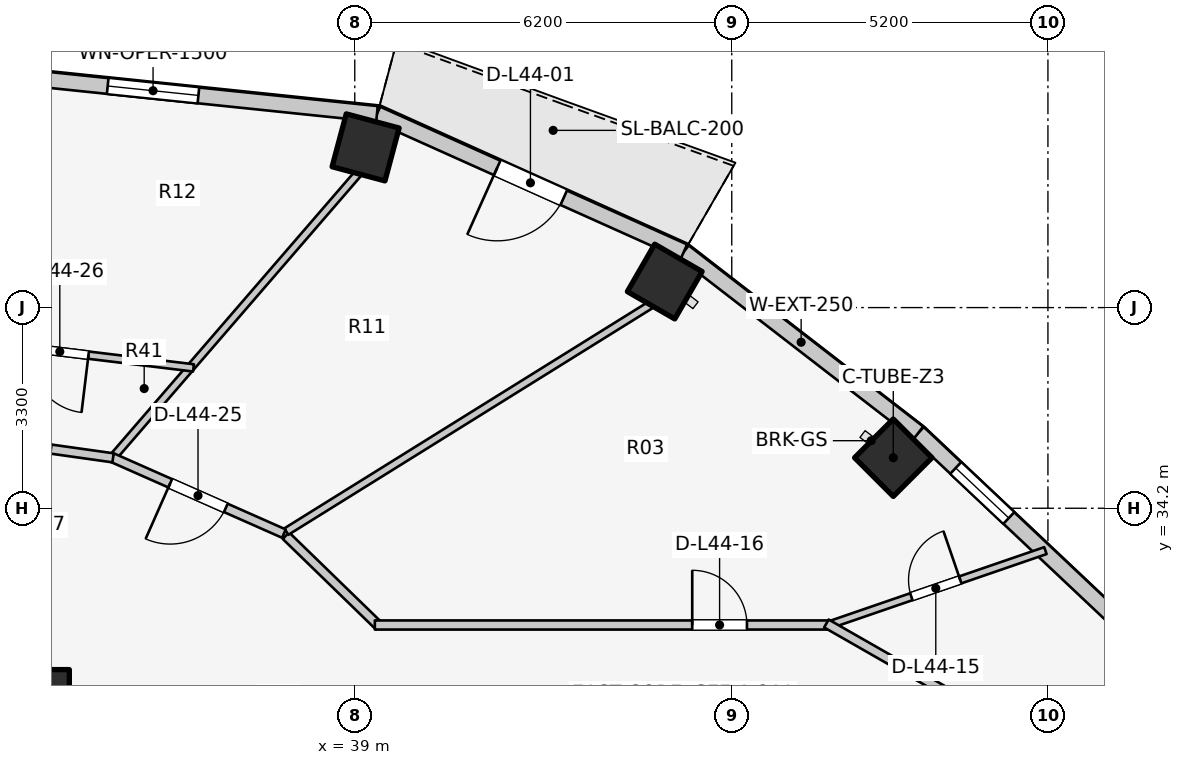
"""IFC4 building model, lengths in metres.
Left out: names, types, materials, properties, quantities, classifications, styles, units other than length and angle.
Written with IfcOpenShell. Run it as: python <this file> out.ifc"""

import sys

from ifc_helpers import new_model, si_unit, direction, frame, frame_2d, origin, origin_2d, place, context, subcontext, project, spatial, rectangle, extrude, element, fill, save


model = new_model("IFC4")
c1 = context("Model", 3, precision=1e-05, world=origin(), true_north=direction((0.0, 1.0)))
c2 = subcontext(c1, "Body", "Model", "MODEL_VIEW")
j1 = project(units=[si_unit("LENGTHUNIT", "METRE"), si_unit("PLANEANGLEUNIT", "RADIAN")], contexts=[c1])
p1 = place(None, origin())
s1 = spatial("IfcSite", under=j1, at=p1, CompositionType="ELEMENT")
p2 = place(p1, origin())
s2 = spatial("IfcBuilding", under=s1, at=p2, CompositionType="ELEMENT")
p3 = place(p2, frame((0.0, 0.0, 146.7)))
s3 = spatial("IfcBuildingStorey", under=s2, at=p3, CompositionType="ELEMENT", Elevation=146.7)
for number, where, z_axis, x_axis in (
    (1, (47.857, 35.031, 0.0), (0.0, 0.0, 1.0), (0.707, 0.707, 0.0)),
    (2, (44.098, 37.928, 0.0), (0.0, 0.0, 1.0), (0.5, 0.866, 0.0)),
):
    element("IfcColumn", number, at=place(p3, frame(where, z_axis=z_axis, x_axis=x_axis)), inside=s3, PredefinedType="COLUMN", context=c2, shape_type="SweptSolid", body=[
        extrude(rectangle(XDim=0.9, YDim=0.9, at=origin_2d()), origin(), (0.0, 0.0, 1.0), 3.1),
    ])
p4 = place(p3, frame((33.931, 31.172, 0.0), z_axis=(0.0, 0.0, 1.0), x_axis=(1.0, 0.0, 0.0)))
e3 = element("IfcColumn", 3, at=p4, inside=s3, PredefinedType="COLUMN", context=c2, shape_type="SweptSolid", body=[
    extrude(rectangle(XDim=0.75, YDim=0.75, at=origin_2d()), origin(), (0.0, 0.0, 1.0), 3.1),
])
p5 = place(p3, frame((39.178, 40.135, 0.0), z_axis=(0.0, 0.0, 1.0), x_axis=(0.258819045103, 0.965925826289, 0.0)))
e4 = element("IfcColumn", 4, at=p5, inside=s3, PredefinedType="COLUMN", context=c2, shape_type="SweptSolid", body=[
    extrude(rectangle(XDim=0.9, YDim=0.9, at=origin_2d()), origin(), (0.0, 0.0, 1.0), 3.1),
])
p6 = place(p3, frame((51.619, 32.284, 0.0), z_axis=(0.0, 0.0, 1.0), x_axis=(-0.727667301037, 0.68593024354, 0.0)))
e5 = element("IfcWall", 5, at=p6, inside=s3, PredefinedType="STANDARD", context=c2, shape_type="SweptSolid", body=[
    extrude(rectangle(XDim=4.604, YDim=0.26, at=frame_2d((2.302, 0.0))), origin(), (0.0, 0.0, 1.0), 2.85),
])
p7 = place(p6, frame((2.56, 0.0, 0.75)))
e6 = element("IfcOpeningElement", 6, at=p7, cuts=e5, PredefinedType="OPENING", context=c2, shape_type="SweptSolid", body=[
    extrude(rectangle(XDim=1.2, YDim=1.5, at=frame_2d((0.6, 0.75))), frame((0.0, 0.14, 0.0), z_axis=(0.0, -1.0, 0.0), x_axis=(1.0, 0.0, 0.0)), (0.0, 0.0, 1.0), 0.28),
])
p8 = place(p3, frame((48.269, 35.441, 0.0), z_axis=(0.0, 0.0, 1.0), x_axis=(-0.791460185804, 0.611220724687, 0.0)))
e7 = element("IfcWall", 7, at=p8, inside=s3, PredefinedType="STANDARD", context=c2, shape_type="SweptSolid", body=[
    extrude(rectangle(XDim=4.872, YDim=0.26, at=frame_2d((2.436, 0.0))), origin(), (0.0, 0.0, 1.0), 2.85),
])
p9 = place(p3, frame((44.413, 38.419, 0.0), z_axis=(0.0, 0.0, 1.0), x_axis=(-0.912353637112, 0.409403029847, 0.0)))
e8 = element("IfcWall", 8, at=p9, inside=s3, PredefinedType="STANDARD", context=c2, shape_type="SweptSolid", body=[
    extrude(rectangle(XDim=5.533, YDim=0.26, at=frame_2d((2.766, 0.0))), origin(), (0.0, 0.0, 1.0), 2.88),
])
p10 = place(p9, frame((2.167, 0.0, 0.0)))
e9 = element("IfcOpeningElement", 9, at=p10, cuts=e8, PredefinedType="OPENING", context=c2, shape_type="SweptSolid", body=[
    extrude(rectangle(XDim=1.2, YDim=2.2, at=frame_2d((0.6, 1.1))), frame((0.0, 0.14, 0.0), z_axis=(0.0, -1.0, 0.0), x_axis=(1.0, 0.0, 0.0)), (0.0, 0.0, 1.0), 0.28),
])
p11 = place(p3, frame((39.365, 40.685, 0.0), z_axis=(0.0, 0.0, 1.0), x_axis=(-0.994664178965, 0.10316574569, 0.0)))
e10 = element("IfcWall", 10, at=p11, inside=s3, PredefinedType="STANDARD", context=c2, shape_type="SweptSolid", body=[
    extrude(rectangle(XDim=7.405, YDim=0.26, at=frame_2d((3.702, 0.0))), origin(), (0.0, 0.0, 1.0), 2.85),
])
p12 = place(p11, frame((2.952, 0.0, 0.75)))
e11 = element("IfcOpeningElement", 11, at=p12, cuts=e10, PredefinedType="OPENING", context=c2, shape_type="SweptSolid", body=[
    extrude(rectangle(XDim=1.5, YDim=1.6, at=frame_2d((0.75, 0.8))), frame((0.0, 0.14, 0.0), z_axis=(0.0, -1.0, 0.0), x_axis=(1.0, 0.0, 0.0)), (0.0, 0.0, 1.0), 0.28),
])
p13 = place(p3, frame((46.753, 32.264, 0.0), z_axis=(0.0, 0.0, 1.0), x_axis=(0.945683523506, 0.325088716151, 0.0)))
e12 = element("IfcWall", 12, at=p13, inside=s3, PredefinedType="MOVABLE", context=c2, shape_type="SweptSolid", body=[
    extrude(rectangle(XDim=3.813, YDim=0.12, at=frame_2d((1.906, 0.0))), origin(), (0.0, 0.0, 1.0), 2.22),
])
p14 = place(p13, frame((1.481, 0.0, 0.0)))
e13 = element("IfcOpeningElement", 13, at=p14, cuts=e12, PredefinedType="OPENING", context=c2, shape_type="SweptSolid", body=[
    extrude(rectangle(XDim=0.85, YDim=2.05, at=frame_2d((0.425, 1.025))), frame((0.0, 0.07, 0.0), z_axis=(0.0, -1.0, 0.0), x_axis=(1.0, 0.0, 0.0)), (0.0, 0.0, 1.0), 0.14),
])
p15 = place(p3, frame((37.867, 33.749, 0.0), z_axis=(0.0, 0.0, 1.0), x_axis=(0.717419568599, -0.696641344302, 0.0)))
e14 = element("IfcWall", 14, at=p15, inside=s3, PredefinedType="PARTITIONING", context=c2, shape_type="SweptSolid", body=[
    extrude(rectangle(XDim=2.138, YDim=0.15, at=frame_2d((1.069, 0.0))), origin(), (0.0, 0.0, 1.0), 2.299),
])
p16 = place(p3, frame((39.33, 32.28, 0.0), z_axis=(0.0, 0.0, 1.0), x_axis=(1.0, 0.0, 0.0)))
e15 = element("IfcWall", 15, at=p16, inside=s3, PredefinedType="PARTITIONING", context=c2, shape_type="SweptSolid", body=[
    extrude(rectangle(XDim=7.52, YDim=0.15, at=frame_2d((3.76, 0.0))), origin(), (0.0, 0.0, 1.0), 2.299),
])
p17 = place(p16, frame((5.22, 0.0, 0.0)))
e16 = element("IfcOpeningElement", 16, at=p17, cuts=e15, PredefinedType="OPENING", context=c2, shape_type="SweptSolid", body=[
    extrude(rectangle(XDim=0.9, YDim=2.1, at=frame_2d((0.45, 1.05))), frame((0.0, 0.085, 0.0), z_axis=(0.0, -1.0, 0.0), x_axis=(1.0, 0.0, 0.0)), (0.0, 0.0, 1.0), 0.17),
])
p18 = place(p3, frame((46.757, 32.305, 0.0), z_axis=(0.0, 0.0, 1.0), x_axis=(0.867991349648, -0.496579315857, 0.0)))
e17 = element("IfcWall", 17, at=p18, inside=s3, PredefinedType="PARTITIONING", context=c2, shape_type="SweptSolid", body=[
    extrude(rectangle(XDim=2.567, YDim=0.15, at=frame_2d((1.283, 0.0))), origin(), (0.0, 0.0, 1.0), 2.22),
])
p19 = place(p3, frame((37.875, 33.816, 0.0), z_axis=(0.0, 0.0, 1.0), x_axis=(0.849008457073, 0.528379257559, 0.0)))
e18 = element("IfcWall", 18, at=p19, inside=s3, PredefinedType="PARTITIONING", context=c2, shape_type="SweptSolid", body=[
    extrude(rectangle(XDim=7.077, YDim=0.125, at=frame_2d((3.539, 0.0))), origin(), (0.0, 0.0, 1.0), 2.299),
])
p20 = place(p3, frame((35.053, 35.073, 0.0), z_axis=(0.0, 0.0, 1.0), x_axis=(0.653779283332, 0.756685303601, 0.0)))
e19 = element("IfcWall", 19, at=p20, inside=s3, PredefinedType="PARTITIONING", context=c2, shape_type="SweptSolid", body=[
    extrude(rectangle(XDim=6.14, YDim=0.125, at=frame_2d((3.07, 0.0))), origin(), (0.0, 0.0, 1.0), 2.299),
])
p21 = place(p3, frame((37.835, 33.783, 0.0), z_axis=(0.0, 0.0, 1.0), x_axis=(-0.91445214467, 0.404694051239, 0.0)))
e20 = element("IfcWall", 20, at=p21, inside=s3, PredefinedType="PARTITIONING", context=c2, shape_type="SweptSolid", body=[
    extrude(rectangle(XDim=3.091, YDim=0.15, at=frame_2d((1.545, 0.0))), origin(), (0.0, 0.0, 1.0), 2.299),
])
p22 = place(p21, frame((1.045, 0.0, 0.0)))
e21 = element("IfcOpeningElement", 21, at=p22, cuts=e20, PredefinedType="OPENING", context=c2, shape_type="SweptSolid", body=[
    extrude(rectangle(XDim=1.0, YDim=2.1, at=frame_2d((0.5, 1.05))), frame((0.0, 0.085, 0.0), z_axis=(0.0, -1.0, 0.0), x_axis=(1.0, 0.0, 0.0)), (0.0, 0.0, 1.0), 0.17),
])
p23 = place(p3, frame((36.347, 36.508, 0.0), z_axis=(0.0, 0.0, 1.0), x_axis=(-0.99272080673, 0.120438365503, 0.0)))
e22 = element("IfcWall", 22, at=p23, inside=s3, PredefinedType="MOVABLE", context=c2, shape_type="SweptSolid", body=[
    extrude(rectangle(XDim=4.429, YDim=0.12, at=frame_2d((2.215, 0.0))), origin(), (0.0, 0.0, 1.0), 2.299),
])
p24 = place(p23, frame((1.74, 0.0, 0.0)))
e23 = element("IfcOpeningElement", 23, at=p24, cuts=e22, PredefinedType="OPENING", context=c2, shape_type="SweptSolid", body=[
    extrude(rectangle(XDim=0.95, YDim=2.1, at=frame_2d((0.475, 1.05))), frame((0.0, 0.07, 0.0), z_axis=(0.0, -1.0, 0.0), x_axis=(1.0, 0.0, 0.0)), (0.0, 0.0, 1.0), 0.14),
])
p25 = place(p3, frame((35.025, 35.029, 0.0), z_axis=(0.0, 0.0, 1.0), x_axis=(-0.990243864279, 0.139345216129, 0.0)))
e24 = element("IfcWall", 24, at=p25, inside=s3, PredefinedType="PARTITIONING", context=c2, shape_type="SweptSolid", body=[
    extrude(rectangle(XDim=3.062, YDim=0.15, at=frame_2d((1.531, 0.0))), origin(), (0.0, 0.0, 1.0), 2.299),
])
p26 = place(p25, frame((1.031, 0.0, 0.0)))
e25 = element("IfcOpeningElement", 25, at=p26, cuts=e24, PredefinedType="OPENING", context=c2, shape_type="SweptSolid", body=[
    extrude(rectangle(XDim=1.0, YDim=2.1, at=frame_2d((0.5, 1.05))), frame((0.0, 0.085, 0.0), z_axis=(0.0, -1.0, 0.0), x_axis=(1.0, 0.0, 0.0)), (0.0, 0.0, 1.0), 0.17),
])
p27 = place(p7, origin())
e26 = element("IfcWindow", 26, at=p27, inside=s3, PartitioningType="SINGLE_PANEL", PredefinedType="WINDOW", context=c2, shape_type="SweptSolid", body=[
    extrude(rectangle(XDim=1.2, YDim=1.5, at=frame_2d((0.6, 0.75))), frame((0.0, 0.03, 0.0), z_axis=(0.0, -1.0, 0.0), x_axis=(1.0, 0.0, 0.0)), (0.0, 0.0, 1.0), 0.06),
])
fill(e6, e26)
p28 = place(p10, origin())
e27 = element("IfcDoor", 27, at=p28, inside=s3, OperationType="SINGLE_SWING_RIGHT", PredefinedType="DOOR", context=c2, shape_type="SweptSolid", body=[
    extrude(rectangle(XDim=1.2, YDim=2.2, at=frame_2d((0.6, 1.1))), frame((0.0, 0.025, 0.0), z_axis=(0.0, -1.0, 0.0), x_axis=(1.0, 0.0, 0.0)), (0.0, 0.0, 1.0), 0.05),
])
fill(e9, e27)
p29 = place(p12, origin())
e28 = element("IfcWindow", 28, at=p29, inside=s3, PartitioningType="SINGLE_PANEL", PredefinedType="WINDOW", context=c2, shape_type="SweptSolid", body=[
    extrude(rectangle(XDim=1.5, YDim=1.6, at=frame_2d((0.75, 0.8))), frame((0.0, 0.03, 0.0), z_axis=(0.0, -1.0, 0.0), x_axis=(1.0, 0.0, 0.0)), (0.0, 0.0, 1.0), 0.06),
])
fill(e11, e28)
p30 = place(p14, origin())
e29 = element("IfcDoor", 29, at=p30, inside=s3, OperationType="SINGLE_SWING_RIGHT", PredefinedType="DOOR", context=c2, shape_type="SweptSolid", body=[
    extrude(rectangle(XDim=0.85, YDim=2.05, at=frame_2d((0.425, 1.025))), frame((0.0, 0.025, 0.0), z_axis=(0.0, -1.0, 0.0), x_axis=(1.0, 0.0, 0.0)), (0.0, 0.0, 1.0), 0.05),
])
fill(e13, e29)
p31 = place(p17, origin())
e30 = element("IfcDoor", 30, at=p31, inside=s3, OperationType="SINGLE_SWING_LEFT", PredefinedType="DOOR", context=c2, shape_type="SweptSolid", body=[
    extrude(rectangle(XDim=0.9, YDim=2.1, at=frame_2d((0.45, 1.05))), frame((0.0, 0.025, 0.0), z_axis=(0.0, -1.0, 0.0), x_axis=(1.0, 0.0, 0.0)), (0.0, 0.0, 1.0), 0.05),
])
fill(e16, e30)
p32 = place(p22, origin())
e31 = element("IfcDoor", 31, at=p32, inside=s3, OperationType="SINGLE_SWING_RIGHT", PredefinedType="DOOR", context=c2, shape_type="SweptSolid", body=[
    extrude(rectangle(XDim=1.0, YDim=2.1, at=frame_2d((0.5, 1.05))), frame((0.0, 0.025, 0.0), z_axis=(0.0, -1.0, 0.0), x_axis=(1.0, 0.0, 0.0)), (0.0, 0.0, 1.0), 0.05),
])
fill(e21, e31)
p33 = place(p24, origin())
e32 = element("IfcDoor", 32, at=p33, inside=s3, OperationType="SINGLE_SWING_LEFT", PredefinedType="DOOR", context=c2, shape_type="SweptSolid", body=[
    extrude(rectangle(XDim=0.95, YDim=2.1, at=frame_2d((0.475, 1.05))), frame((0.0, 0.025, 0.0), z_axis=(0.0, -1.0, 0.0), x_axis=(1.0, 0.0, 0.0)), (0.0, 0.0, 1.0), 0.05),
])
fill(e23, e32)
save(model, sys.argv[1])
